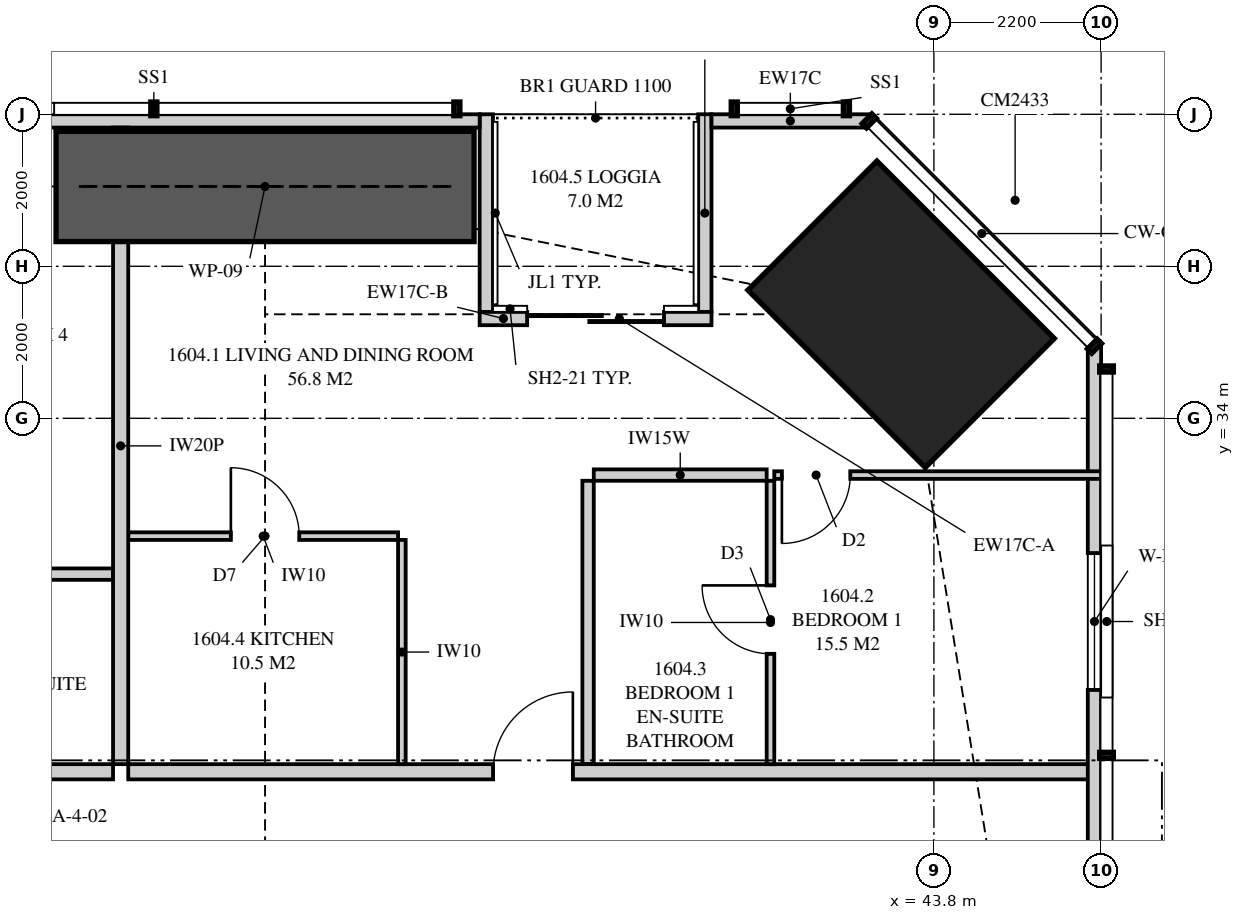
"""IFC4 building model, lengths in metres.
Left out: names, types, materials, properties, quantities, classifications, styles, units other than length and angle.
Written with IfcOpenShell. Run it as: python <this file> out.ifc"""

import sys

from ifc_helpers import new_model, si_unit, direction, frame, frame_2d, origin, origin_2d, place, context, subcontext, project, spatial, polyline, rectangle, outline, extrude, element, fill, save


model = new_model("IFC4")
c1 = context("Model", 3, precision=1e-05, world=origin(), true_north=direction((0.0, 1.0)))
c2 = subcontext(c1, "Body", "Model", "MODEL_VIEW")
j1 = project(units=[si_unit("LENGTHUNIT", "METRE"), si_unit("PLANEANGLEUNIT", "RADIAN")], contexts=[c1])
p1 = place(None, origin())
s1 = spatial("IfcSite", under=j1, at=p1, CompositionType="ELEMENT")
p2 = place(p1, origin())
s2 = spatial("IfcBuilding", under=s1, at=p2, CompositionType="ELEMENT")
p3 = place(p2, frame((0.0, 0.0, 61.2)))
s3 = spatial("IfcBuildingStorey", under=s2, at=p3, CompositionType="ELEMENT", Elevation=61.2)
p4 = place(p3, frame((43.369, 35.369, 0.0), z_axis=(0.0, 0.0, 1.0), x_axis=(-0.707106781187, -0.707106781187, 0.0)))
e1 = element("IfcColumn", 1, at=p4, inside=s3, PredefinedType="COLUMN", context=c2, shape_type="SweptSolid", body=[
    extrude(rectangle(XDim=2.4, YDim=3.3, at=origin_2d()), origin(), (0.0, 0.0, 1.0), 3.35),
])
p5 = place(p3, frame((45.913, 3.051, 0.0), z_axis=(0.0, 0.0, 1.0), x_axis=(0.0, 1.0, 0.0)))
e2 = element("IfcWall", 2, at=p5, inside=s3, PredefinedType="SOLIDWALL", context=c2, shape_type="SweptSolid", body=[
    extrude(outline(polyline([(0.0, 0.0), (31.897, 0.0), (31.897, 3.11), (22.167, 3.11), (22.167, 2.15), (22.074, 2.15), (22.074, 3.11), (21.949, 3.11), (21.949, 2.15), (9.949, 2.15), (9.949, 3.11), (9.823, 3.11), (9.823, 2.15), (9.73, 2.15), (9.73, 3.11), (0.0, 3.11), (0.0, 0.0)])), frame((0.0, 0.087, 0.0), z_axis=(0.0, -1.0, 0.0), x_axis=(1.0, 0.0, 0.0)), (0.0, 0.0, 1.0), 0.175),
])
p6 = place(p5, frame((2.222, 0.0, 0.4)))
e3 = element("IfcOpeningElement", 3, at=p6, cuts=e2, PredefinedType="OPENING", context=c2, shape_type="SweptSolid", body=[
    extrude(rectangle(XDim=1.8, YDim=1.7, at=frame_2d((0.9, 0.85))), frame((0.0, 0.097, 0.0), z_axis=(0.0, -1.0, 0.0), x_axis=(1.0, 0.0, 0.0)), (0.0, 0.0, 1.0), 0.195),
])
p7 = place(p5, frame((14.849, 0.0, 0.4)))
e4 = element("IfcOpeningElement", 4, at=p7, cuts=e2, PredefinedType="OPENING", context=c2, shape_type="SweptSolid", body=[
    extrude(rectangle(XDim=1.2, YDim=1.7, at=frame_2d((0.6, 0.85))), frame((0.0, 0.097, 0.0), z_axis=(0.0, -1.0, 0.0), x_axis=(1.0, 0.0, 0.0)), (0.0, 0.0, 1.0), 0.195),
])
p8 = place(p5, frame((27.375, 0.0, 0.4)))
e5 = element("IfcOpeningElement", 5, at=p8, cuts=e2, PredefinedType="OPENING", context=c2, shape_type="SweptSolid", body=[
    extrude(rectangle(XDim=1.8, YDim=1.7, at=frame_2d((0.9, 0.85))), frame((0.0, 0.097, 0.0), z_axis=(0.0, -1.0, 0.0), x_axis=(1.0, 0.0, 0.0)), (0.0, 0.0, 1.0), 0.195),
])
p9 = place(p3, frame((42.949, 37.913, 0.0), z_axis=(0.0, 0.0, 1.0), x_axis=(-1.0, 0.0, 0.0)))
e6 = element("IfcWall", 6, at=p9, inside=s3, PredefinedType="SOLIDWALL", context=c2, shape_type="SweptSolid", body=[
    extrude(rectangle(XDim=2.075, YDim=0.175, at=frame_2d((1.038, 0.0))), origin(), (0.0, 0.0, 1.0), 3.11),
])
p10 = place(p3, frame((37.824, 37.913, 0.0), z_axis=(0.0, 0.0, 1.0), x_axis=(-1.0, 0.0, 0.0)))
e7 = element("IfcWall", 7, at=p10, inside=s3, PredefinedType="SOLIDWALL", context=c2, shape_type="SweptSolid", body=[
    extrude(outline(polyline([(0.0, 0.0), (17.374, 0.0), (17.374, 2.15), (2.824, 2.15), (2.824, 3.11), (2.668, 3.11), (2.668, 2.15), (2.62, 2.15), (2.62, 3.11), (0.0, 3.11), (0.0, 0.0)])), frame((0.0, 0.087, 0.0), z_axis=(0.0, -1.0, 0.0), x_axis=(1.0, 0.0, 0.0)), (0.0, 0.0, 1.0), 0.175),
])
p11 = place(p10, frame((5.699, 0.0, 0.4)))
e8 = element("IfcOpeningElement", 8, at=p11, cuts=e7, PredefinedType="OPENING", context=c2, shape_type="SweptSolid", body=[
    extrude(rectangle(XDim=1.8, YDim=1.7, at=frame_2d((0.9, 0.85))), frame((0.0, 0.097, 0.0), z_axis=(0.0, -1.0, 0.0), x_axis=(1.0, 0.0, 0.0)), (0.0, 0.0, 1.0), 0.195),
])
p12 = place(p10, frame((9.124, 0.0, 0.4)))
e9 = element("IfcOpeningElement", 9, at=p12, cuts=e7, PredefinedType="OPENING", context=c2, shape_type="SweptSolid", body=[
    extrude(rectangle(XDim=1.8, YDim=1.7, at=frame_2d((0.9, 0.85))), frame((0.0, 0.097, 0.0), z_axis=(0.0, -1.0, 0.0), x_axis=(1.0, 0.0, 0.0)), (0.0, 0.0, 1.0), 0.195),
])
p13 = place(p3, frame((40.874, 35.312, 0.0), z_axis=(0.0, 0.0, 1.0), x_axis=(-1.0, 0.0, 0.0)))
e10 = element("IfcWall", 10, at=p13, inside=s3, PredefinedType="SOLIDWALL", context=c2, shape_type="SweptSolid", body=[
    extrude(rectangle(XDim=2.425, YDim=0.175, at=frame_2d((1.212, 0.0))), origin(), (0.0, 0.0, 1.0), 2.15),
])
p14 = place(p13, frame((0.625, 0.0, 0.0)))
e11 = element("IfcOpeningElement", 11, at=p14, cuts=e10, PredefinedType="OPENING", context=c2, shape_type="SweptSolid", body=[
    extrude(rectangle(XDim=1.8, YDim=2.1, at=frame_2d((0.9, 1.05))), frame((0.0, 0.097, 0.0), z_axis=(0.0, -1.0, 0.0), x_axis=(1.0, 0.0, 0.0)), (0.0, 0.0, 1.0), 0.195),
])
p15 = place(p3, frame((38.449, 35.312, 0.0), z_axis=(0.0, 0.0, 1.0), x_axis=(-1.0, 0.0, 0.0)))
e12 = element("IfcWall", 12, at=p15, inside=s3, PredefinedType="SOLIDWALL", context=c2, shape_type="SweptSolid", body=[
    extrude(rectangle(XDim=0.625, YDim=0.175, at=frame_2d((0.312, 0.0))), origin(), (0.0, 0.0, 1.0), 2.51),
])
p16 = place(p3, frame((40.786, 38.0, 0.0), z_axis=(0.0, 0.0, 1.0), x_axis=(0.0, -1.0, 0.0)))
e13 = element("IfcWall", 13, at=p16, inside=s3, PredefinedType="SOLIDWALL", context=c2, shape_type="SweptSolid", body=[
    extrude(outline(polyline([(0.0, 0.0), (2.6, 0.0), (2.6, 2.15), (1.279, 2.15), (1.279, 3.11), (0.0, 3.11), (0.0, 0.0)])), frame((0.0, 0.087, 0.0), z_axis=(0.0, -1.0, 0.0), x_axis=(1.0, 0.0, 0.0)), (0.0, 0.0, 1.0), 0.175),
])
p17 = place(p3, frame((37.911, 38.0, 0.0), z_axis=(0.0, 0.0, 1.0), x_axis=(0.0, -1.0, 0.0)))
e14 = element("IfcWall", 14, at=p17, inside=s3, PredefinedType="SOLIDWALL", context=c2, shape_type="SweptSolid", body=[
    extrude(outline(polyline([(0.0, 0.0), (2.6, 0.0), (2.6, 2.51), (2.368, 2.51), (2.368, 2.15), (0.701, 2.15), (0.701, 3.11), (0.0, 3.11), (0.0, 0.0)])), frame((0.0, 0.087, 0.0), z_axis=(0.0, -1.0, 0.0), x_axis=(1.0, 0.0, 0.0)), (0.0, 0.0, 1.0), 0.175),
])
p18 = place(p3, frame((33.1, 37.825, 0.0), z_axis=(0.0, 0.0, 1.0), x_axis=(0.0, -1.0, 0.0)))
e15 = element("IfcWall", 15, at=p18, inside=s3, PredefinedType="PARTITIONING", context=c2, shape_type="SweptSolid", body=[
    extrude(outline(polyline([(0.529, 2.15), (0.0, 2.15), (0.0, 0.0), (0.529, 0.0), (0.529, 0.205), (1.021, 0.205), (1.021, 0.0), (8.375, 0.0), (8.375, 3.11), (1.685, 3.11), (1.685, 2.15), (1.021, 2.15), (1.021, 1.945), (0.529, 1.945), (0.529, 2.15)])), frame((0.0, 0.1, 0.0), z_axis=(0.0, -1.0, 0.0), x_axis=(1.0, 0.0, 0.0)), (0.0, 0.0, 1.0), 0.2),
])
p19 = place(p3, frame((17.725, 29.35, 0.0), z_axis=(0.0, 0.0, 1.0), x_axis=(1.0, 0.0, 0.0)))
e16 = element("IfcWall", 16, at=p19, inside=s3, PredefinedType="PARTITIONING", context=c2, shape_type="SweptSolid", body=[
    extrude(outline(polyline([(0.0, 0.0), (15.275, 0.0), (15.275, 3.11), (6.612, 3.11), (6.612, 2.541), (5.938, 2.541), (5.938, 3.11), (0.0, 3.11), (0.0, 0.0)])), frame((0.0, 0.1, 0.0), z_axis=(0.0, -1.0, 0.0), x_axis=(1.0, 0.0, 0.0)), (0.0, 0.0, 1.0), 0.2),
])
p20 = place(p19, frame((0.2, 0.0, 0.0)))
e17 = element("IfcOpeningElement", 17, at=p20, cuts=e16, PredefinedType="OPENING", context=c2, shape_type="SweptSolid", body=[
    extrude(rectangle(XDim=1.05, YDim=2.2, at=frame_2d((0.525, 1.1))), frame((0.0, 0.11, 0.0), z_axis=(0.0, -1.0, 0.0), x_axis=(1.0, 0.0, 0.0)), (0.0, 0.0, 1.0), 0.22),
])
p21 = place(p3, frame((29.55, 31.95, 0.0), z_axis=(0.0, 0.0, 1.0), x_axis=(1.0, 0.0, 0.0)))
e18 = element("IfcWall", 18, at=p21, inside=s3, PredefinedType="PLUMBINGWALL", context=c2, shape_type="SweptSolid", body=[
    extrude(rectangle(XDim=3.45, YDim=0.15, at=frame_2d((1.725, 0.0))), origin(), (0.0, 0.0, 1.0), 3.11),
])
p22 = place(p21, frame((0.4, 0.0, 0.0)))
e19 = element("IfcOpeningElement", 19, at=p22, cuts=e18, PredefinedType="OPENING", context=c2, shape_type="SweptSolid", body=[
    extrude(rectangle(XDim=0.9, YDim=2.1, at=frame_2d((0.45, 1.05))), frame((0.0, 0.085, 0.0), z_axis=(0.0, -1.0, 0.0), x_axis=(1.0, 0.0, 0.0)), (0.0, 0.0, 1.0), 0.17),
])
p23 = place(p3, frame((33.2, 29.35, 0.0), z_axis=(0.0, 0.0, 1.0), x_axis=(1.0, 0.0, 0.0)))
e20 = element("IfcWall", 20, at=p23, inside=s3, PredefinedType="PARTITIONING", context=c2, shape_type="SweptSolid", body=[
    extrude(outline(polyline([(0.0, 0.0), (12.8, 0.0), (12.8, 3.11), (12.066, 3.11), (12.066, 2.15), (10.223, 2.15), (10.223, 3.11), (2.137, 3.11), (2.137, 2.541), (1.463, 2.541), (1.463, 3.11), (0.0, 3.11), (0.0, 0.0)])), frame((0.0, 0.1, 0.0), z_axis=(0.0, -1.0, 0.0), x_axis=(1.0, 0.0, 0.0)), (0.0, 0.0, 1.0), 0.2),
])
p24 = place(p23, frame((4.8, 0.0, 0.0)))
e21 = element("IfcOpeningElement", 21, at=p24, cuts=e20, PredefinedType="OPENING", context=c2, shape_type="SweptSolid", body=[
    extrude(rectangle(XDim=1.05, YDim=2.2, at=frame_2d((0.525, 1.1))), frame((0.0, 0.11, 0.0), z_axis=(0.0, -1.0, 0.0), x_axis=(1.0, 0.0, 0.0)), (0.0, 0.0, 1.0), 0.22),
])
p25 = place(p3, frame((41.65, 33.178, 0.0), z_axis=(0.0, 0.0, 1.0), x_axis=(0.0, -1.0, 0.0)))
e22 = element("IfcWall", 22, at=p25, inside=s3, PredefinedType="PARTITIONING", context=c2, shape_type="SweptSolid", body=[
    extrude(rectangle(XDim=3.728, YDim=0.1, at=frame_2d((1.864, 0.0))), origin(), (0.0, 0.0, 1.0), 3.11),
])
p26 = place(p25, frame((1.377, 0.0, 0.0)))
e23 = element("IfcOpeningElement", 23, at=p26, cuts=e22, PredefinedType="OPENING", context=c2, shape_type="SweptSolid", body=[
    extrude(rectangle(XDim=0.9, YDim=2.1, at=frame_2d((0.45, 1.05))), frame((0.0, 0.06, 0.0), z_axis=(0.0, -1.0, 0.0), x_axis=(1.0, 0.0, 0.0)), (0.0, 0.0, 1.0), 0.12),
])
p27 = place(p3, frame((41.7, 33.253, 0.0), z_axis=(0.0, 0.0, 1.0), x_axis=(1.0, 0.0, 0.0)))
e24 = element("IfcWall", 24, at=p27, inside=s3, PredefinedType="PARTITIONING", context=c2, shape_type="SweptSolid", body=[
    extrude(outline(polyline([(0.0, 0.0), (4.3, 0.0), (4.3, 3.11), (2.883, 3.11), (2.883, 2.15), (1.14, 2.15), (1.14, 3.11), (0.0, 3.11), (0.0, 0.0)])), frame((0.0, 0.05, 0.0), z_axis=(0.0, -1.0, 0.0), x_axis=(1.0, 0.0, 0.0)), (0.0, 0.0, 1.0), 0.1),
])
p28 = place(p27, frame((0.1, 0.0, 0.0)))
e25 = element("IfcOpeningElement", 25, at=p28, cuts=e24, PredefinedType="OPENING", context=c2, shape_type="SweptSolid", body=[
    extrude(rectangle(XDim=0.9, YDim=2.1, at=frame_2d((0.45, 1.05))), frame((0.0, 0.06, 0.0), z_axis=(0.0, -1.0, 0.0), x_axis=(1.0, 0.0, 0.0)), (0.0, 0.0, 1.0), 0.12),
])
p29 = place(p3, frame((39.325, 33.253, 0.0), z_axis=(0.0, 0.0, 1.0), x_axis=(1.0, 0.0, 0.0)))
e26 = element("IfcWall", 26, at=p29, inside=s3, PredefinedType="PLUMBINGWALL", context=c2, shape_type="SweptSolid", body=[
    extrude(rectangle(XDim=2.275, YDim=0.15, at=frame_2d((1.138, 0.0))), origin(), (0.0, 0.0, 1.0), 3.11),
])
p30 = place(p3, frame((39.25, 33.178, 0.0), z_axis=(0.0, 0.0, 1.0), x_axis=(0.0, -1.0, 0.0)))
e27 = element("IfcWall", 27, at=p30, inside=s3, PredefinedType="PLUMBINGWALL", context=c2, shape_type="SweptSolid", body=[
    extrude(rectangle(XDim=3.728, YDim=0.15, at=frame_2d((1.864, 0.0))), origin(), (0.0, 0.0, 1.0), 3.11),
])
p31 = place(p3, frame((33.2, 32.45, 0.0), z_axis=(0.0, 0.0, 1.0), x_axis=(1.0, 0.0, 0.0)))
e28 = element("IfcWall", 28, at=p31, inside=s3, PredefinedType="PARTITIONING", context=c2, shape_type="SweptSolid", body=[
    extrude(outline(polyline([(0.0, 0.0), (3.55, 0.0), (3.55, 3.11), (2.087, 3.11), (2.087, 2.541), (1.513, 2.541), (1.513, 3.11), (0.0, 3.11), (0.0, 0.0)])), frame((0.0, 0.05, 0.0), z_axis=(0.0, -1.0, 0.0), x_axis=(1.0, 0.0, 0.0)), (0.0, 0.0, 1.0), 0.1),
])
p32 = place(p31, frame((1.35, 0.0, 0.0)))
e29 = element("IfcOpeningElement", 29, at=p32, cuts=e28, PredefinedType="OPENING", context=c2, shape_type="SweptSolid", body=[
    extrude(rectangle(XDim=0.9, YDim=2.1, at=frame_2d((0.45, 1.05))), frame((0.0, 0.06, 0.0), z_axis=(0.0, -1.0, 0.0), x_axis=(1.0, 0.0, 0.0)), (0.0, 0.0, 1.0), 0.12),
])
p33 = place(p3, frame((36.8, 32.4, 0.0), z_axis=(0.0, 0.0, 1.0), x_axis=(0.0, -1.0, 0.0)))
e30 = element("IfcWall", 30, at=p33, inside=s3, PredefinedType="PARTITIONING", context=c2, shape_type="SweptSolid", body=[
    extrude(rectangle(XDim=2.95, YDim=0.1, at=frame_2d((1.475, 0.0))), origin(), (0.0, 0.0, 1.0), 3.11),
])
p34 = place(p3, frame((32.25, 37.05, 0.0), z_axis=(0.0, 0.0, 1.0), x_axis=(1.0, 0.0, 0.0)))
e31 = element("IfcWall", 31, at=p34, inside=s3, PredefinedType="SHEAR", context=c2, shape_type="SweptSolid", body=[
    extrude(rectangle(XDim=5.5, YDim=1.45, at=frame_2d((2.75, 0.0))), origin(), (0.0, 0.0, 1.0), 3.35),
])
p35 = place(p8, origin())
e32 = element("IfcWindow", 32, at=p35, inside=s3, PartitioningType="SINGLE_PANEL", PredefinedType="WINDOW", context=c2, shape_type="SweptSolid", body=[
    extrude(rectangle(XDim=1.8, YDim=1.7, at=frame_2d((0.9, 0.85))), frame((0.0, 0.03, 0.0), z_axis=(0.0, -1.0, 0.0), x_axis=(1.0, 0.0, 0.0)), (0.0, 0.0, 1.0), 0.06),
])
fill(e5, e32)
p36 = place(p14, origin())
e33 = element("IfcDoor", 33, at=p36, inside=s3, OperationType="SLIDING_TO_LEFT", PredefinedType="DOOR", context=c2, shape_type="SweptSolid", body=[
    extrude(rectangle(XDim=1.8, YDim=2.1, at=frame_2d((0.9, 1.05))), frame((0.0, 0.025, 0.0), z_axis=(0.0, -1.0, 0.0), x_axis=(1.0, 0.0, 0.0)), (0.0, 0.0, 1.0), 0.05),
])
fill(e11, e33)
p37 = place(p24, origin())
e34 = element("IfcDoor", 34, at=p37, inside=s3, OperationType="SINGLE_SWING_RIGHT", PredefinedType="DOOR", context=c2, shape_type="SweptSolid", body=[
    extrude(rectangle(XDim=1.05, YDim=2.2, at=frame_2d((0.525, 1.1))), frame((0.0, 0.025, 0.0), z_axis=(0.0, -1.0, 0.0), x_axis=(1.0, 0.0, 0.0)), (0.0, 0.0, 1.0), 0.05),
])
fill(e21, e34)
p38 = place(p28, frame((0.9, 0.0, 0.0), z_axis=(0.0, 0.0, 1.0), x_axis=(-1.0, 0.0, 0.0)))
e35 = element("IfcDoor", 35, at=p38, inside=s3, OperationType="SINGLE_SWING_RIGHT", PredefinedType="DOOR", context=c2, shape_type="SweptSolid", body=[
    extrude(rectangle(XDim=0.9, YDim=2.1, at=frame_2d((0.45, 1.05))), frame((0.0, 0.025, 0.0), z_axis=(0.0, -1.0, 0.0), x_axis=(1.0, 0.0, 0.0)), (0.0, 0.0, 1.0), 0.05),
])
fill(e25, e35)
p39 = place(p26, frame((0.9, 0.0, 0.0), z_axis=(0.0, 0.0, 1.0), x_axis=(-1.0, 0.0, 0.0)))
e36 = element("IfcDoor", 36, at=p39, inside=s3, OperationType="SINGLE_SWING_RIGHT", PredefinedType="DOOR", context=c2, shape_type="SweptSolid", body=[
    extrude(rectangle(XDim=0.9, YDim=2.1, at=frame_2d((0.45, 1.05))), frame((0.0, 0.025, 0.0), z_axis=(0.0, -1.0, 0.0), x_axis=(1.0, 0.0, 0.0)), (0.0, 0.0, 1.0), 0.05),
])
fill(e23, e36)
p40 = place(p32, origin())
e37 = element("IfcDoor", 37, at=p40, inside=s3, OperationType="SINGLE_SWING_LEFT", PredefinedType="DOOR", context=c2, shape_type="SweptSolid", body=[
    extrude(rectangle(XDim=0.9, YDim=2.1, at=frame_2d((0.45, 1.05))), frame((0.0, 0.025, 0.0), z_axis=(0.0, -1.0, 0.0), x_axis=(1.0, 0.0, 0.0)), (0.0, 0.0, 1.0), 0.05),
])
fill(e29, e37)
save(model, sys.argv[1])
